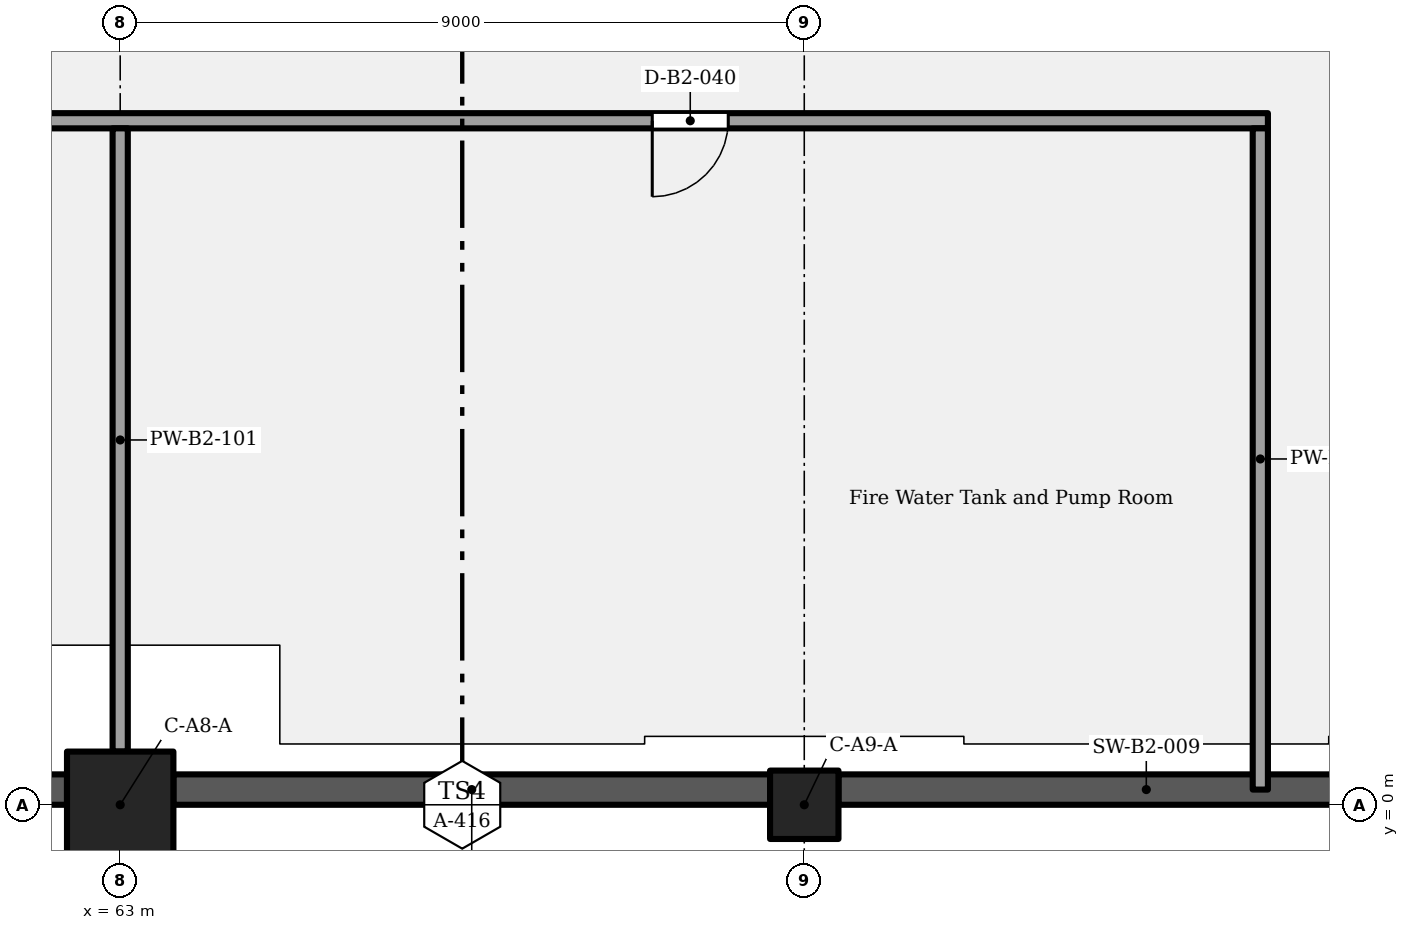
"""IFC4 building model, lengths in metres.
Left out: names, types, materials, properties, quantities, classifications, styles, units other than length and angle.
Written with IfcOpenShell. Run it as: python <this file> out.ifc"""

import sys

from ifc_helpers import new_model, si_unit, direction, frame, frame_2d, origin, origin_2d, place, context, subcontext, project, spatial, rectangle, extrude, element, fill, save


model = new_model("IFC4")
c1 = context("Model", 3, precision=1e-05, world=origin(), true_north=direction((0.0, 1.0)))
c2 = subcontext(c1, "Body", "Model", "MODEL_VIEW")
j1 = project(units=[si_unit("LENGTHUNIT", "METRE"), si_unit("PLANEANGLEUNIT", "RADIAN")], contexts=[c1])
p1 = place(None, origin())
s1 = spatial("IfcSite", under=j1, at=p1, CompositionType="ELEMENT")
p2 = place(p1, origin())
s2 = spatial("IfcBuilding", under=s1, at=p2, CompositionType="ELEMENT")
p3 = place(p2, frame((0.0, 0.0, -8.4)))
s3 = spatial("IfcBuildingStorey", under=s2, at=p3, CompositionType="ELEMENT", Elevation=-8.4)
p4 = place(p3, frame((63.0, 0.0, 0.0), z_axis=(0.0, 0.0, 1.0), x_axis=(1.0, 0.0, 0.0)))
e1 = element("IfcColumn", 1, at=p4, inside=s3, PredefinedType="COLUMN", context=c2, shape_type="SweptSolid", body=[
    extrude(rectangle(XDim=1.4, YDim=1.4, at=origin_2d()), origin(), (0.0, 0.0, 1.0), 4.2),
])
p5 = place(p3, frame((72.0, 0.0, 0.0), z_axis=(0.0, 0.0, 1.0), x_axis=(1.0, 0.0, 0.0)))
e2 = element("IfcColumn", 2, at=p5, inside=s3, PredefinedType="COLUMN", context=c2, shape_type="SweptSolid", body=[
    extrude(rectangle(XDim=0.9, YDim=0.9, at=origin_2d()), origin(), (0.0, 0.0, 1.0), 4.2),
])
p6 = place(p3, frame((54.7, 0.2, 0.0), z_axis=(0.0, 0.0, 1.0), x_axis=(1.0, 0.0, 0.0)))
e3 = element("IfcWall", 3, at=p6, inside=s3, PredefinedType="SOLIDWALL", context=c2, shape_type="SweptSolid", body=[
    extrude(rectangle(XDim=7.6, YDim=0.4, at=frame_2d((3.8, 0.0))), origin(), (0.0, 0.0, 1.0), 3.8),
])
p7 = place(p3, frame((63.7, 0.2, 0.0), z_axis=(0.0, 0.0, 1.0), x_axis=(1.0, 0.0, 0.0)))
e4 = element("IfcWall", 4, at=p7, inside=s3, PredefinedType="SOLIDWALL", context=c2, shape_type="SweptSolid", body=[
    extrude(rectangle(XDim=7.85, YDim=0.4, at=frame_2d((3.925, 0.0))), origin(), (0.0, 0.0, 1.0), 3.8),
])
p8 = place(p3, frame((72.45, 0.2, 0.0), z_axis=(0.0, 0.0, 1.0), x_axis=(1.0, 0.0, 0.0)))
e5 = element("IfcWall", 5, at=p8, inside=s3, PredefinedType="SOLIDWALL", context=c2, shape_type="SweptSolid", body=[
    extrude(rectangle(XDim=8.1, YDim=0.4, at=frame_2d((4.05, 0.0))), origin(), (0.0, 0.0, 1.0), 3.8),
])
p9 = place(p3, frame((11.9, 9.0, 0.0), z_axis=(0.0, 0.0, 1.0), x_axis=(1.0, 0.0, 0.0)))
e6 = element("IfcWall", 6, at=p9, inside=s3, PredefinedType="PARTITIONING", context=c2, shape_type="SweptSolid", body=[
    extrude(rectangle(XDim=66.2, YDim=0.2, at=frame_2d((33.1, 0.0))), origin(), (0.0, 0.0, 1.0), 3.8),
])
p10 = place(p9, frame((8.1, 0.0, 0.0), z_axis=(0.0, 0.0, 1.0), x_axis=(-1.0, 0.0, 0.0)))
e7 = element("IfcOpeningElement", 7, at=p10, cuts=e6, PredefinedType="OPENING", context=c2, shape_type="SweptSolid", body=[
    extrude(rectangle(XDim=1.0, YDim=2.1, at=frame_2d((0.5, 1.05))), frame((0.0, 0.11, 0.0), z_axis=(0.0, -1.0, 0.0), x_axis=(1.0, 0.0, 0.0)), (0.0, 0.0, 1.0), 0.22),
])
p11 = place(p9, frame((25.0, 0.0, 0.0), z_axis=(0.0, 0.0, 1.0), x_axis=(-1.0, 0.0, 0.0)))
e8 = element("IfcOpeningElement", 8, at=p11, cuts=e6, PredefinedType="OPENING", context=c2, shape_type="SweptSolid", body=[
    extrude(rectangle(XDim=1.8, YDim=2.4, at=frame_2d((0.9, 1.2))), frame((0.0, 0.11, 0.0), z_axis=(0.0, -1.0, 0.0), x_axis=(1.0, 0.0, 0.0)), (0.0, 0.0, 1.0), 0.22),
])
p12 = place(p9, frame((43.0, 0.0, 0.0), z_axis=(0.0, 0.0, 1.0), x_axis=(-1.0, 0.0, 0.0)))
e9 = element("IfcOpeningElement", 9, at=p12, cuts=e6, PredefinedType="OPENING", context=c2, shape_type="SweptSolid", body=[
    extrude(rectangle(XDim=1.8, YDim=2.4, at=frame_2d((0.9, 1.2))), frame((0.0, 0.11, 0.0), z_axis=(0.0, -1.0, 0.0), x_axis=(1.0, 0.0, 0.0)), (0.0, 0.0, 1.0), 0.22),
])
p13 = place(p9, frame((59.1, 0.0, 0.0), z_axis=(0.0, 0.0, 1.0), x_axis=(-1.0, 0.0, 0.0)))
e10 = element("IfcOpeningElement", 10, at=p13, cuts=e6, PredefinedType="OPENING", context=c2, shape_type="SweptSolid", body=[
    extrude(rectangle(XDim=1.0, YDim=2.1, at=frame_2d((0.5, 1.05))), frame((0.0, 0.11, 0.0), z_axis=(0.0, -1.0, 0.0), x_axis=(1.0, 0.0, 0.0)), (0.0, 0.0, 1.0), 0.22),
])
p14 = place(p3, frame((63.0, 0.7, 0.0), z_axis=(0.0, 0.0, 1.0), x_axis=(0.0, 1.0, 0.0)))
e11 = element("IfcWall", 11, at=p14, inside=s3, PredefinedType="PARTITIONING", context=c2, shape_type="SweptSolid", body=[
    extrude(rectangle(XDim=8.2, YDim=0.2, at=frame_2d((4.1, 0.0))), origin(), (0.0, 0.0, 1.0), 3.05),
])
p15 = place(p3, frame((78.0, 0.2, 0.0), z_axis=(0.0, 0.0, 1.0), x_axis=(0.0, 1.0, 0.0)))
e12 = element("IfcWall", 12, at=p15, inside=s3, PredefinedType="PARTITIONING", context=c2, shape_type="SweptSolid", body=[
    extrude(rectangle(XDim=8.7, YDim=0.2, at=frame_2d((4.35, 0.0))), origin(), (0.0, 0.0, 1.0), 3.8),
])
p16 = place(p13, origin())
e13 = element("IfcDoor", 13, at=p16, inside=s3, OperationType="SINGLE_SWING_RIGHT", PredefinedType="DOOR", context=c2, shape_type="SweptSolid", body=[
    extrude(rectangle(XDim=1.0, YDim=2.1, at=frame_2d((0.5, 1.05))), frame((0.0, 0.025, 0.0), z_axis=(0.0, -1.0, 0.0), x_axis=(1.0, 0.0, 0.0)), (0.0, 0.0, 1.0), 0.05),
])
fill(e10, e13)
save(model, sys.argv[1])
